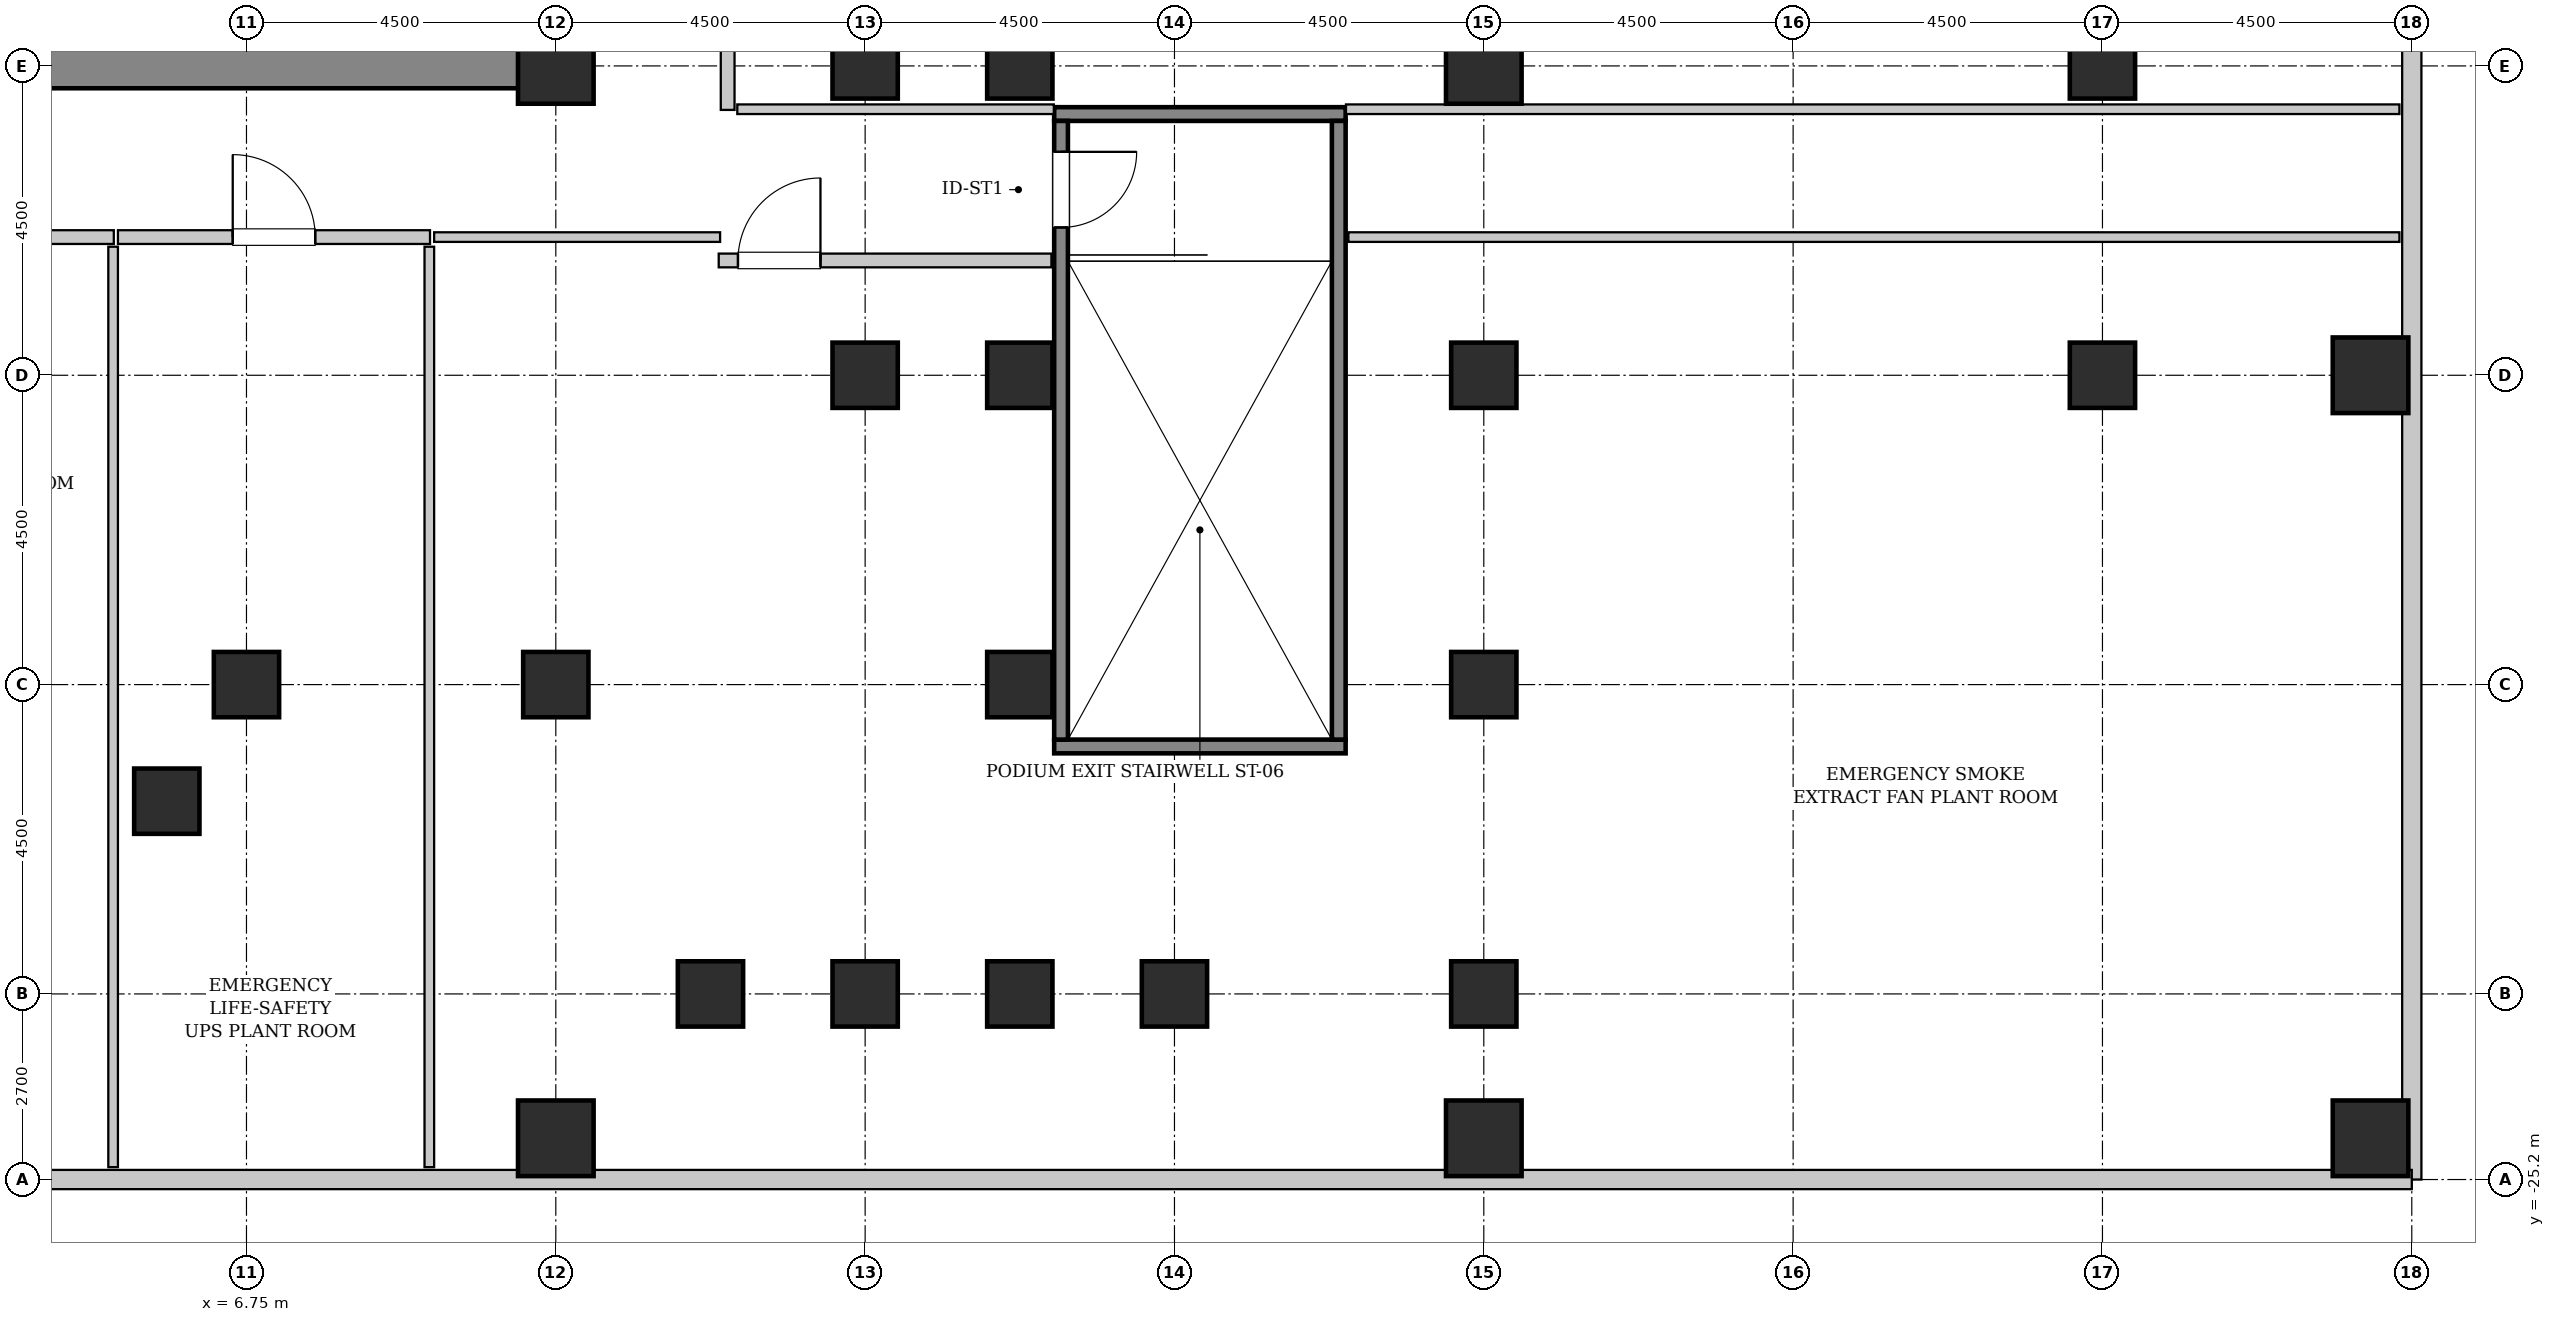
"""IFC4 building model, lengths in metres.
Left out: names, types, materials, properties, quantities, classifications, styles, units other than length and angle.
Written with IfcOpenShell. Run it as: python <this file> out.ifc"""

import sys

from ifc_helpers import new_model, si_unit, direction, frame, frame_2d, origin, origin_2d, place, context, subcontext, project, spatial, rectangle, hollow_rectangle, extrude, source, transform, mapped, element, fill, save


model = new_model("IFC4")
c1 = context("Model", 3, precision=1e-05, world=origin(), true_north=direction((0.0, 1.0)))
c2 = subcontext(c1, "Body", "Model", "MODEL_VIEW")
j1 = project(units=[si_unit("LENGTHUNIT", "METRE"), si_unit("PLANEANGLEUNIT", "RADIAN")], contexts=[c1])
p1 = place(None, origin())
s1 = spatial("IfcSite", under=j1, at=p1, CompositionType="ELEMENT")
p2 = place(p1, origin())
s2 = spatial("IfcBuilding", under=s1, at=p2, CompositionType="ELEMENT")
p3 = place(p2, frame((0.0, 0.0, 27.6)))
s3 = spatial("IfcBuildingStorey", under=s2, at=p3, CompositionType="ELEMENT", Elevation=27.6)
m1 = source(origin(), c2, "Body", "SweptSolid", [
    extrude(rectangle(XDim=10.025, YDim=0.65, at=frame_2d((5.012, 0.0))), origin(), (0.0, 0.0, 1.0), 5.4),
])
p4 = place(p3, frame((1.55, -9.0, 0.0), z_axis=(0.0, 0.0, 1.0), x_axis=(1.0, 0.0, 0.0)))
e1 = element("IfcWall", 1, at=p4, inside=s3, PredefinedType="SHEAR", context=c2, shape_type="MappedRepresentation", body=[
    mapped(m1, transform((0.0, 0.0, 0.0), x_axis=(1.0, 0.0, 0.0), y_axis=(0.0, 1.0, 0.0), z_axis=(0.0, 0.0, 1.0), scale=1.0)),
])
m2 = source(origin(), c2, "Body", "SweptSolid", [
    extrude(hollow_rectangle(XDim=1.1, YDim=1.1, WallThickness=0.055, InnerFilletRadius=0.055, OuterFilletRadius=0.11, at=origin_2d()), origin(), (0.0, 0.0, 1.0), 5.4),
])
p5 = place(p3, frame((11.25, -24.6, 0.0), z_axis=(0.0, 0.0, 1.0), x_axis=(1.0, 0.0, 0.0)))
e2 = element("IfcColumn", 2, at=p5, inside=s3, PredefinedType="COLUMN", context=c2, shape_type="MappedRepresentation", body=[
    mapped(m2, transform((0.0, 0.0, 0.0), x_axis=(1.0, 0.0, 0.0), y_axis=(0.0, 1.0, 0.0), z_axis=(0.0, 0.0, 1.0), scale=1.0)),
])
m3 = source(origin(), c2, "Body", "SweptSolid", [
    extrude(hollow_rectangle(XDim=1.1, YDim=1.1, WallThickness=0.055, InnerFilletRadius=0.055, OuterFilletRadius=0.11, at=origin_2d()), origin(), (0.0, 0.0, 1.0), 5.4),
])
p6 = place(p3, frame((11.25, -9.0, 0.0), z_axis=(0.0, 0.0, 1.0), x_axis=(1.0, 0.0, 0.0)))
e3 = element("IfcColumn", 3, at=p6, inside=s3, PredefinedType="COLUMN", context=c2, shape_type="MappedRepresentation", body=[
    mapped(m3, transform((0.0, 0.0, 0.0), x_axis=(1.0, 0.0, 0.0), y_axis=(0.0, 1.0, 0.0), z_axis=(0.0, 0.0, 1.0), scale=1.0)),
])
p7 = place(p3, frame((24.75, -24.6, 0.0), z_axis=(0.0, 0.0, 1.0), x_axis=(1.0, 0.0, 0.0)))
e4 = element("IfcColumn", 4, at=p7, inside=s3, PredefinedType="COLUMN", context=c2, shape_type="MappedRepresentation", body=[
    mapped(m2, transform((0.0, 0.0, 0.0), x_axis=(1.0, 0.0, 0.0), y_axis=(0.0, 1.0, 0.0), z_axis=(0.0, 0.0, 1.0), scale=1.0)),
])
p8 = place(p3, frame((24.75, -9.0, 0.0), z_axis=(0.0, 0.0, 1.0), x_axis=(1.0, 0.0, 0.0)))
e5 = element("IfcColumn", 5, at=p8, inside=s3, PredefinedType="COLUMN", context=c2, shape_type="MappedRepresentation", body=[
    mapped(m3, transform((0.0, 0.0, 0.0), x_axis=(1.0, 0.0, 0.0), y_axis=(0.0, 1.0, 0.0), z_axis=(0.0, 0.0, 1.0), scale=1.0)),
])
for number, where, z_axis, x_axis in (
    (6, (37.65, -24.6, 0.0), (0.0, 0.0, 1.0), (1.0, 0.0, 0.0)),
    (7, (37.65, -13.5, 0.0), (0.0, 0.0, 1.0), (1.0, 0.0, 0.0)),
):
    element("IfcColumn", number, at=place(p3, frame(where, z_axis=z_axis, x_axis=x_axis)), inside=s3, PredefinedType="COLUMN", context=c2, shape_type="MappedRepresentation", body=[
        mapped(m2, transform((0.0, 0.0, 0.0), x_axis=(1.0, 0.0, 0.0), y_axis=(0.0, 1.0, 0.0), z_axis=(0.0, 0.0, 1.0), scale=1.0)),
    ])
m4 = source(origin(), c2, "Body", "SweptSolid", [
    extrude(hollow_rectangle(XDim=0.95, YDim=0.95, WallThickness=0.045, InnerFilletRadius=0.045, OuterFilletRadius=0.09, at=origin_2d()), origin(), (0.0, 0.0, 1.0), 5.4),
])
for number, where, z_axis, x_axis in (
    (8, (5.591, -19.696, 0.0), (0.0, 0.0, 1.0), (1.0, 0.0, 0.0)),
    (9, (6.75, -18.0, 0.0), (0.0, 0.0, 1.0), (1.0, 0.0, 0.0)),
    (10, (11.25, -18.0, 0.0), (0.0, 0.0, 1.0), (1.0, 0.0, 0.0)),
    (11, (13.5, -22.5, 0.0), (0.0, 0.0, 1.0), (1.0, 0.0, 0.0)),
    (12, (15.75, -22.5, 0.0), (0.0, 0.0, 1.0), (1.0, 0.0, 0.0)),
    (13, (15.75, -13.5, 0.0), (0.0, 0.0, 1.0), (1.0, 0.0, 0.0)),
    (14, (15.75, -9.0, 0.0), (0.0, 0.0, 1.0), (1.0, 0.0, 0.0)),
    (15, (18.0, -22.5, 0.0), (0.0, 0.0, 1.0), (1.0, 0.0, 0.0)),
    (16, (18.0, -18.0, 0.0), (0.0, 0.0, 1.0), (1.0, 0.0, 0.0)),
    (17, (18.0, -13.5, 0.0), (0.0, 0.0, 1.0), (1.0, 0.0, 0.0)),
    (18, (18.0, -9.0, 0.0), (0.0, 0.0, 1.0), (1.0, 0.0, 0.0)),
    (19, (20.25, -22.5, 0.0), (0.0, 0.0, 1.0), (1.0, 0.0, 0.0)),
    (20, (24.75, -22.5, 0.0), (0.0, 0.0, 1.0), (1.0, 0.0, 0.0)),
    (21, (24.75, -18.0, 0.0), (0.0, 0.0, 1.0), (1.0, 0.0, 0.0)),
    (22, (24.75, -13.5, 0.0), (0.0, 0.0, 1.0), (1.0, 0.0, 0.0)),
    (23, (33.75, -13.5, 0.0), (0.0, 0.0, 1.0), (1.0, 0.0, 0.0)),
    (24, (33.75, -9.0, 0.0), (0.0, 0.0, 1.0), (1.0, 0.0, 0.0)),
):
    element("IfcColumn", number, at=place(p3, frame(where, z_axis=z_axis, x_axis=x_axis)), inside=s3, PredefinedType="COLUMN", context=c2, shape_type="MappedRepresentation", body=[
        mapped(m4, transform((0.0, 0.0, 0.0), x_axis=(1.0, 0.0, 0.0), y_axis=(0.0, 1.0, 0.0), z_axis=(0.0, 0.0, 1.0), scale=1.0)),
    ])
m5 = source(origin(), c2, "Body", "SweptSolid", [
    extrude(rectangle(XDim=50.4, YDim=0.28, at=frame_2d((25.2, 0.0))), origin(), (0.0, 0.0, 1.0), 5.15),
])
p9 = place(p3, frame((38.25, -25.2, 0.0), z_axis=(0.0, 0.0, 1.0), x_axis=(0.0, 1.0, 0.0)))
e25 = element("IfcWall", 25, at=p9, inside=s3, PredefinedType="SOLIDWALL", context=c2, shape_type="MappedRepresentation", body=[
    mapped(m5, transform((0.0, 0.0, 0.0), x_axis=(1.0, 0.0, 0.0), y_axis=(0.0, 1.0, 0.0), z_axis=(0.0, 0.0, 1.0), scale=1.0)),
])
m6 = source(origin(), c2, "Body", "SweptSolid", [
    extrude(rectangle(XDim=76.5, YDim=0.28, at=frame_2d((38.25, 0.0))), origin(), (0.0, 0.0, 1.0), 5.15),
])
p10 = place(p3, frame((-38.25, -25.2, 0.0), z_axis=(0.0, 0.0, 1.0), x_axis=(1.0, 0.0, 0.0)))
e26 = element("IfcWall", 26, at=p10, inside=s3, PredefinedType="SOLIDWALL", context=c2, shape_type="MappedRepresentation", body=[
    mapped(m6, transform((0.0, 0.0, 0.0), x_axis=(1.0, 0.0, 0.0), y_axis=(0.0, 1.0, 0.0), z_axis=(0.0, 0.0, 1.0), scale=1.0)),
])
m7 = source(origin(), c2, "Body", "SweptSolid", [
    extrude(rectangle(XDim=4.24, YDim=0.2, at=frame_2d((2.12, 0.0))), origin(), (0.0, 0.0, 1.0), 5.15),
])
for number, where, z_axis, x_axis in (
    (27, (18.5, -9.7, 0.0), (0.0, 0.0, 1.0), (1.0, 0.0, 0.0)),
    (28, (18.5, -18.9, 0.0), (0.0, 0.0, 1.0), (1.0, 0.0, 0.0)),
):
    element("IfcWall", number, at=place(p3, frame(where, z_axis=z_axis, x_axis=x_axis)), inside=s3, PredefinedType="SOLIDWALL", context=c2, shape_type="MappedRepresentation", body=[
        mapped(m7, transform((0.0, 0.0, 0.0), x_axis=(1.0, 0.0, 0.0), y_axis=(0.0, 1.0, 0.0), z_axis=(0.0, 0.0, 1.0), scale=1.0)),
    ])
m8 = source(origin(), c2, "Body", "SweptSolid", [
    extrude(rectangle(XDim=9.0, YDim=0.2, at=frame_2d((4.5, 0.0))), origin(), (0.0, 0.0, 1.0), 5.15),
])
p11 = place(p3, frame((18.6, -9.8, 0.0), z_axis=(0.0, 0.0, 1.0), x_axis=(0.0, -1.0, 0.0)))
e29 = element("IfcWall", 29, at=p11, inside=s3, PredefinedType="SOLIDWALL", context=c2, shape_type="MappedRepresentation", body=[
    mapped(m8, transform((0.0, 0.0, 0.0), x_axis=(1.0, 0.0, 0.0), y_axis=(0.0, 1.0, 0.0), z_axis=(0.0, 0.0, 1.0), scale=1.0)),
])
p12 = place(p11, frame((0.45, 0.0, 0.0)))
e30 = element("IfcOpeningElement", 30, at=p12, cuts=e29, PredefinedType="OPENING", context=c2, shape_type="SweptSolid", body=[
    extrude(rectangle(XDim=1.1, YDim=2.15, at=frame_2d((0.55, 1.075))), frame((0.0, 0.11, 0.0), z_axis=(0.0, -1.0, 0.0), x_axis=(1.0, 0.0, 0.0)), (0.0, 0.0, 1.0), 0.22),
])
p13 = place(p3, frame((22.64, -9.8, 0.0), z_axis=(0.0, 0.0, 1.0), x_axis=(0.0, -1.0, 0.0)))
e31 = element("IfcWall", 31, at=p13, inside=s3, PredefinedType="SOLIDWALL", context=c2, shape_type="MappedRepresentation", body=[
    mapped(m8, transform((0.0, 0.0, 0.0), x_axis=(1.0, 0.0, 0.0), y_axis=(0.0, 1.0, 0.0), z_axis=(0.0, 0.0, 1.0), scale=1.0)),
])
m9 = source(origin(), c2, "Body", "SweptSolid", [
    extrude(rectangle(XDim=19.28, YDim=0.2, at=frame_2d((9.64, 0.0))), origin(), (0.0, 0.0, 1.0), 5.135),
])
p14 = place(p3, frame((13.75, -9.64, 0.0), z_axis=(0.0, 0.0, 1.0), x_axis=(0.0, 1.0, 0.0)))
e32 = element("IfcWall", 32, at=p14, inside=s3, PredefinedType="SOLIDWALL", context=c2, shape_type="MappedRepresentation", body=[
    mapped(m9, transform((0.0, 0.0, 0.0), x_axis=(1.0, 0.0, 0.0), y_axis=(0.0, 1.0, 0.0), z_axis=(0.0, 0.0, 1.0), scale=1.0)),
])
p15 = place(p14, frame((9.04, 0.0, 0.0)))
e33 = element("IfcOpeningElement", 33, at=p15, cuts=e32, PredefinedType="OPENING", context=c2, shape_type="SweptSolid", body=[
    extrude(rectangle(XDim=1.2, YDim=2.15, at=frame_2d((0.6, 1.075))), frame((0.0, 0.11, 0.0), z_axis=(0.0, -1.0, 0.0), x_axis=(1.0, 0.0, 0.0)), (0.0, 0.0, 1.0), 0.22),
])
m10 = source(origin(), c2, "Body", "SweptSolid", [
    extrude(rectangle(XDim=4.605, YDim=0.14, at=frame_2d((2.303, 0.0))), origin(), (0.0, 0.0, 1.0), 5.135),
])
p16 = place(p3, frame((13.89, -9.63, 0.0), z_axis=(0.0, 0.0, 1.0), x_axis=(1.0, 0.0, 0.0)))
e34 = element("IfcWall", 34, at=p16, inside=s3, PredefinedType="PARTITIONING", context=c2, shape_type="MappedRepresentation", body=[
    mapped(m10, transform((0.0, 0.0, 0.0), x_axis=(1.0, 0.0, 0.0), y_axis=(0.0, 1.0, 0.0), z_axis=(0.0, 0.0, 1.0), scale=1.0)),
])
m11 = source(origin(), c2, "Body", "SweptSolid", [
    extrude(rectangle(XDim=15.325, YDim=0.14, at=frame_2d((7.663, 0.0))), origin(), (0.0, 0.0, 1.0), 5.135),
])
p17 = place(p3, frame((22.745, -9.63, 0.0), z_axis=(0.0, 0.0, 1.0), x_axis=(1.0, 0.0, 0.0)))
e35 = element("IfcWall", 35, at=p17, inside=s3, PredefinedType="PARTITIONING", context=c2, shape_type="MappedRepresentation", body=[
    mapped(m11, transform((0.0, 0.0, 0.0), x_axis=(1.0, 0.0, 0.0), y_axis=(0.0, 1.0, 0.0), z_axis=(0.0, 0.0, 1.0), scale=1.0)),
])
m12 = source(origin(), c2, "Body", "SweptSolid", [
    extrude(rectangle(XDim=4.79, YDim=0.2, at=frame_2d((2.395, 0.0))), origin(), (0.0, 0.0, 1.0), 5.135),
])
p18 = place(p3, frame((0.03, -11.49, 0.0), z_axis=(0.0, 0.0, 1.0), x_axis=(1.0, 0.0, 0.0)))
e36 = element("IfcWall", 36, at=p18, inside=s3, PredefinedType="SOLIDWALL", context=c2, shape_type="MappedRepresentation", body=[
    mapped(m12, transform((0.0, 0.0, 0.0), x_axis=(1.0, 0.0, 0.0), y_axis=(0.0, 1.0, 0.0), z_axis=(0.0, 0.0, 1.0), scale=1.0)),
])
p19 = place(p18, frame((1.795, 0.0, 0.0)))
e37 = element("IfcOpeningElement", 37, at=p19, cuts=e36, PredefinedType="OPENING", context=c2, shape_type="SweptSolid", body=[
    extrude(rectangle(XDim=1.2, YDim=2.15, at=frame_2d((0.6, 1.075))), frame((0.0, 0.11, 0.0), z_axis=(0.0, -1.0, 0.0), x_axis=(1.0, 0.0, 0.0)), (0.0, 0.0, 1.0), 0.22),
])
m13 = source(origin(), c2, "Body", "SweptSolid", [
    extrude(rectangle(XDim=13.39, YDim=0.14, at=frame_2d((6.695, 0.0))), origin(), (0.0, 0.0, 1.0), 5.135),
])
p20 = place(p3, frame((4.81, -25.02, 0.0), z_axis=(0.0, 0.0, 1.0), x_axis=(0.0, 1.0, 0.0)))
e38 = element("IfcWall", 38, at=p20, inside=s3, PredefinedType="PARTITIONING", context=c2, shape_type="MappedRepresentation", body=[
    mapped(m13, transform((0.0, 0.0, 0.0), x_axis=(1.0, 0.0, 0.0), y_axis=(0.0, 1.0, 0.0), z_axis=(0.0, 0.0, 1.0), scale=1.0)),
])
m14 = source(origin(), c2, "Body", "SweptSolid", [
    extrude(rectangle(XDim=4.54, YDim=0.2, at=frame_2d((2.27, 0.0))), origin(), (0.0, 0.0, 1.0), 5.135),
])
p21 = place(p3, frame((4.88, -11.49, 0.0), z_axis=(0.0, 0.0, 1.0), x_axis=(1.0, 0.0, 0.0)))
e39 = element("IfcWall", 39, at=p21, inside=s3, PredefinedType="SOLIDWALL", context=c2, shape_type="MappedRepresentation", body=[
    mapped(m14, transform((0.0, 0.0, 0.0), x_axis=(1.0, 0.0, 0.0), y_axis=(0.0, 1.0, 0.0), z_axis=(0.0, 0.0, 1.0), scale=1.0)),
])
p22 = place(p21, frame((1.67, 0.0, 0.0)))
e40 = element("IfcOpeningElement", 40, at=p22, cuts=e39, PredefinedType="OPENING", context=c2, shape_type="SweptSolid", body=[
    extrude(rectangle(XDim=1.2, YDim=2.15, at=frame_2d((0.6, 1.075))), frame((0.0, 0.11, 0.0), z_axis=(0.0, -1.0, 0.0), x_axis=(1.0, 0.0, 0.0)), (0.0, 0.0, 1.0), 0.22),
])
p23 = place(p3, frame((9.41, -25.02, 0.0), z_axis=(0.0, 0.0, 1.0), x_axis=(0.0, 1.0, 0.0)))
e41 = element("IfcWall", 41, at=p23, inside=s3, PredefinedType="PARTITIONING", context=c2, shape_type="MappedRepresentation", body=[
    mapped(m13, transform((0.0, 0.0, 0.0), x_axis=(1.0, 0.0, 0.0), y_axis=(0.0, 1.0, 0.0), z_axis=(0.0, 0.0, 1.0), scale=1.0)),
])
m15 = source(origin(), c2, "Body", "SweptSolid", [
    extrude(rectangle(XDim=4.84, YDim=0.2, at=frame_2d((2.42, 0.0))), origin(), (0.0, 0.0, 1.0), 5.135),
])
p24 = place(p3, frame((13.62, -11.83, 0.0), z_axis=(0.0, 0.0, 1.0), x_axis=(1.0, 0.0, 0.0)))
e42 = element("IfcWall", 42, at=p24, inside=s3, PredefinedType="SOLIDWALL", context=c2, shape_type="MappedRepresentation", body=[
    mapped(m15, transform((0.0, 0.0, 0.0), x_axis=(1.0, 0.0, 0.0), y_axis=(0.0, 1.0, 0.0), z_axis=(0.0, 0.0, 1.0), scale=1.0)),
])
p25 = place(p24, frame((0.28, 0.0, 0.0)))
e43 = element("IfcOpeningElement", 43, at=p25, cuts=e42, PredefinedType="OPENING", context=c2, shape_type="SweptSolid", body=[
    extrude(rectangle(XDim=1.2, YDim=2.15, at=frame_2d((0.6, 1.075))), frame((0.0, 0.11, 0.0), z_axis=(0.0, -1.0, 0.0), x_axis=(1.0, 0.0, 0.0)), (0.0, 0.0, 1.0), 0.22),
])
m16 = source(origin(), c2, "Body", "SweptSolid", [
    extrude(rectangle(XDim=4.16, YDim=0.14, at=frame_2d((2.08, 0.0))), origin(), (0.0, 0.0, 1.0), 5.135),
])
p26 = place(p3, frame((9.48, -11.49, 0.0), z_axis=(0.0, 0.0, 1.0), x_axis=(1.0, 0.0, 0.0)))
e44 = element("IfcWall", 44, at=p26, inside=s3, PredefinedType="PARTITIONING", context=c2, shape_type="MappedRepresentation", body=[
    mapped(m16, transform((0.0, 0.0, 0.0), x_axis=(1.0, 0.0, 0.0), y_axis=(0.0, 1.0, 0.0), z_axis=(0.0, 0.0, 1.0), scale=1.0)),
])
m17 = source(origin(), c2, "Body", "SweptSolid", [
    extrude(rectangle(XDim=15.29, YDim=0.14, at=frame_2d((7.645, 0.0))), origin(), (0.0, 0.0, 1.0), 5.135),
])
p27 = place(p3, frame((22.78, -11.49, 0.0), z_axis=(0.0, 0.0, 1.0), x_axis=(1.0, 0.0, 0.0)))
e45 = element("IfcWall", 45, at=p27, inside=s3, PredefinedType="PARTITIONING", context=c2, shape_type="MappedRepresentation", body=[
    mapped(m17, transform((0.0, 0.0, 0.0), x_axis=(1.0, 0.0, 0.0), y_axis=(0.0, 1.0, 0.0), z_axis=(0.0, 0.0, 1.0), scale=1.0)),
])
m18 = source(origin(), c2, "Body", "SweptSolid", [
    extrude(rectangle(XDim=1.1, YDim=2.15, at=frame_2d((0.55, 1.075))), frame((0.0, 0.025, 0.0), z_axis=(0.0, -1.0, 0.0), x_axis=(1.0, 0.0, 0.0)), (0.0, 0.0, 1.0), 0.05),
])
p28 = place(p12, origin())
e46 = element("IfcDoor", 46, at=p28, inside=s3, OperationType="SINGLE_SWING_LEFT", PredefinedType="DOOR", context=c2, shape_type="MappedRepresentation", body=[
    mapped(m18, transform((0.0, 0.0, 0.0), x_axis=(1.0, 0.0, 0.0), y_axis=(0.0, 1.0, 0.0), z_axis=(0.0, 0.0, 1.0), scale=1.0)),
])
fill(e30, e46)
m19 = source(origin(), c2, "Body", "SweptSolid", [
    extrude(rectangle(XDim=1.2, YDim=2.15, at=frame_2d((0.6, 1.075))), frame((0.0, 0.025, 0.0), z_axis=(0.0, -1.0, 0.0), x_axis=(1.0, 0.0, 0.0)), (0.0, 0.0, 1.0), 0.05),
])
p29 = place(p22, origin())
e47 = element("IfcDoor", 47, at=p29, inside=s3, OperationType="SINGLE_SWING_LEFT", PredefinedType="DOOR", context=c2, shape_type="MappedRepresentation", body=[
    mapped(m19, transform((0.0, 0.0, 0.0), x_axis=(1.0, 0.0, 0.0), y_axis=(0.0, 1.0, 0.0), z_axis=(0.0, 0.0, 1.0), scale=1.0)),
])
fill(e40, e47)
p30 = place(p25, origin())
e48 = element("IfcDoor", 48, at=p30, inside=s3, OperationType="SINGLE_SWING_RIGHT", PredefinedType="DOOR", context=c2, shape_type="MappedRepresentation", body=[
    mapped(m19, transform((0.0, 0.0, 0.0), x_axis=(1.0, 0.0, 0.0), y_axis=(0.0, 1.0, 0.0), z_axis=(0.0, 0.0, 1.0), scale=1.0)),
])
fill(e43, e48)
save(model, sys.argv[1])
